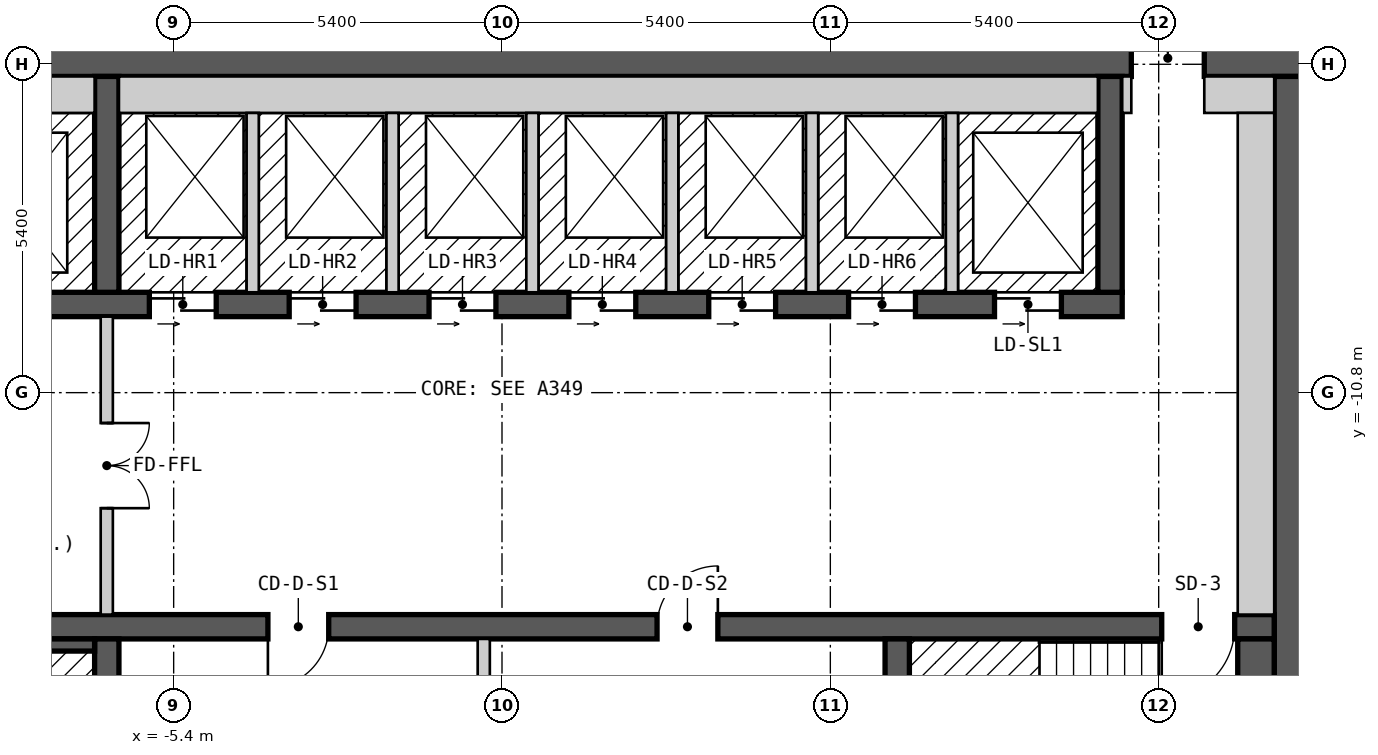
"""IFC4 building model, lengths in metres.
Left out: names, types, materials, properties, quantities, classifications, styles, units other than length and angle.
Written with IfcOpenShell. Run it as: python <this file> out.ifc"""

import sys

from ifc_helpers import new_model, si_unit, direction, frame, frame_2d, origin, place, context, subcontext, project, spatial, rectangle, extrude, element, fill, save


model = new_model("IFC4")
c1 = context("Model", 3, precision=1e-05, world=origin(), true_north=direction((0.0, 1.0)))
c2 = subcontext(c1, "Body", "Model", "MODEL_VIEW")
j1 = project(units=[si_unit("LENGTHUNIT", "METRE"), si_unit("PLANEANGLEUNIT", "RADIAN")], contexts=[c1])
p1 = place(None, origin())
s1 = spatial("IfcSite", under=j1, at=p1, CompositionType="ELEMENT")
p2 = place(p1, origin())
s2 = spatial("IfcBuilding", under=s1, at=p2, CompositionType="ELEMENT")
p3 = place(p2, frame((0.0, 0.0, 181.2)))
s3 = spatial("IfcBuildingStorey", under=s2, at=p3, CompositionType="ELEMENT", Elevation=181.2)
p4 = place(p3, frame((-13.3, -5.3, 0.0), z_axis=(0.0, 0.0, 1.0), x_axis=(1.0, 0.0, 0.0)))
e1 = element("IfcWall", 1, at=p4, inside=s3, PredefinedType="SHEAR", context=c2, shape_type="SweptSolid", body=[
    extrude(rectangle(XDim=26.6, YDim=0.6, at=frame_2d((13.3, 0.0))), origin(), (0.0, 0.0, 1.0), 2.7),
])
p5 = place(p4, frame((23.65, 0.0, 0.0)))
e2 = element("IfcOpeningElement", 2, at=p5, cuts=e1, PredefinedType="OPENING", context=c2, shape_type="SweptSolid", body=[
    extrude(rectangle(XDim=1.2, YDim=2.1, at=frame_2d((0.6, 1.05))), frame((0.0, 0.31, 0.0), z_axis=(0.0, -1.0, 0.0), x_axis=(1.0, 0.0, 0.0)), (0.0, 0.0, 1.0), 0.62),
])
p6 = place(p3, frame((13.0, -18.4, 0.0), z_axis=(0.0, 0.0, 1.0), x_axis=(0.0, 1.0, 0.0)))
e3 = element("IfcWall", 3, at=p6, inside=s3, PredefinedType="SHEAR", context=c2, shape_type="SweptSolid", body=[
    extrude(rectangle(XDim=12.8, YDim=0.6, at=frame_2d((6.4, 0.0))), origin(), (0.0, 0.0, 1.0), 2.7),
])
p7 = place(p3, frame((-12.7, -14.65, 0.0), z_axis=(0.0, 0.0, 1.0), x_axis=(1.0, 0.0, 0.0)))
e4 = element("IfcWall", 4, at=p7, inside=s3, PredefinedType="SHEAR", context=c2, shape_type="SweptSolid", body=[
    extrude(rectangle(XDim=25.4, YDim=0.4, at=frame_2d((12.7, 0.0))), origin(), (0.0, 0.0, 1.0), 2.7),
])
p8 = place(p7, frame((1.9, 0.0, 0.0), z_axis=(0.0, 0.0, 1.0), x_axis=(-1.0, 0.0, 0.0)))
e5 = element("IfcOpeningElement", 5, at=p8, cuts=e4, PredefinedType="OPENING", context=c2, shape_type="SweptSolid", body=[
    extrude(rectangle(XDim=1.2, YDim=2.1, at=frame_2d((0.6, 1.05))), frame((0.0, 0.21, 0.0), z_axis=(0.0, -1.0, 0.0), x_axis=(1.0, 0.0, 0.0)), (0.0, 0.0, 1.0), 0.42),
])
p9 = place(p7, frame((24.75, 0.0, 0.0), z_axis=(0.0, 0.0, 1.0), x_axis=(-1.0, 0.0, 0.0)))
e6 = element("IfcOpeningElement", 6, at=p9, cuts=e4, PredefinedType="OPENING", context=c2, shape_type="SweptSolid", body=[
    extrude(rectangle(XDim=1.2, YDim=2.1, at=frame_2d((0.6, 1.05))), frame((0.0, 0.21, 0.0), z_axis=(0.0, -1.0, 0.0), x_axis=(1.0, 0.0, 0.0)), (0.0, 0.0, 1.0), 0.42),
])
p10 = place(p7, frame((9.85, 0.0, 0.0), z_axis=(0.0, 0.0, 1.0), x_axis=(-1.0, 0.0, 0.0)))
e7 = element("IfcOpeningElement", 7, at=p10, cuts=e4, PredefinedType="OPENING", context=c2, shape_type="SweptSolid", body=[
    extrude(rectangle(XDim=1.0, YDim=2.1, at=frame_2d((0.5, 1.05))), frame((0.0, 0.21, 0.0), z_axis=(0.0, -1.0, 0.0), x_axis=(1.0, 0.0, 0.0)), (0.0, 0.0, 1.0), 0.42),
])
p11 = place(p7, frame((16.25, 0.0, 0.0), z_axis=(0.0, 0.0, 1.0), x_axis=(-1.0, 0.0, 0.0)))
e8 = element("IfcOpeningElement", 8, at=p11, cuts=e4, PredefinedType="OPENING", context=c2, shape_type="SweptSolid", body=[
    extrude(rectangle(XDim=1.0, YDim=2.1, at=frame_2d((0.5, 1.05))), frame((0.0, 0.21, 0.0), z_axis=(0.0, -1.0, 0.0), x_axis=(1.0, 0.0, 0.0)), (0.0, 0.0, 1.0), 0.42),
])
p12 = place(p3, frame((-12.7, -9.35, 0.0), z_axis=(0.0, 0.0, 1.0), x_axis=(1.0, 0.0, 0.0)))
e9 = element("IfcWall", 9, at=p12, inside=s3, PredefinedType="SHEAR", context=c2, shape_type="SweptSolid", body=[
    extrude(rectangle(XDim=22.9, YDim=0.4, at=frame_2d((11.45, 0.0))), origin(), (0.0, 0.0, 1.0), 2.7),
])
p13 = place(p12, frame((1.3, 0.0, 0.0)))
e10 = element("IfcOpeningElement", 10, at=p13, cuts=e9, PredefinedType="OPENING", context=c2, shape_type="SweptSolid", body=[
    extrude(rectangle(XDim=1.1, YDim=2.1, at=frame_2d((0.55, 1.05))), frame((0.0, 0.21, 0.0), z_axis=(0.0, -1.0, 0.0), x_axis=(1.0, 0.0, 0.0)), (0.0, 0.0, 1.0), 0.42),
])
p14 = place(p12, frame((4.1, 0.0, 0.0)))
e11 = element("IfcOpeningElement", 11, at=p14, cuts=e9, PredefinedType="OPENING", context=c2, shape_type="SweptSolid", body=[
    extrude(rectangle(XDim=1.1, YDim=2.1, at=frame_2d((0.55, 1.05))), frame((0.0, 0.21, 0.0), z_axis=(0.0, -1.0, 0.0), x_axis=(1.0, 0.0, 0.0)), (0.0, 0.0, 1.0), 0.42),
])
p15 = place(p12, frame((6.9, 0.0, 0.0)))
e12 = element("IfcOpeningElement", 12, at=p15, cuts=e9, PredefinedType="OPENING", context=c2, shape_type="SweptSolid", body=[
    extrude(rectangle(XDim=1.1, YDim=2.1, at=frame_2d((0.55, 1.05))), frame((0.0, 0.21, 0.0), z_axis=(0.0, -1.0, 0.0), x_axis=(1.0, 0.0, 0.0)), (0.0, 0.0, 1.0), 0.42),
])
p16 = place(p12, frame((9.2, 0.0, 0.0)))
e13 = element("IfcOpeningElement", 13, at=p16, cuts=e9, PredefinedType="OPENING", context=c2, shape_type="SweptSolid", body=[
    extrude(rectangle(XDim=1.1, YDim=2.1, at=frame_2d((0.55, 1.05))), frame((0.0, 0.21, 0.0), z_axis=(0.0, -1.0, 0.0), x_axis=(1.0, 0.0, 0.0)), (0.0, 0.0, 1.0), 0.42),
])
p17 = place(p12, frame((11.5, 0.0, 0.0)))
e14 = element("IfcOpeningElement", 14, at=p17, cuts=e9, PredefinedType="OPENING", context=c2, shape_type="SweptSolid", body=[
    extrude(rectangle(XDim=1.1, YDim=2.1, at=frame_2d((0.55, 1.05))), frame((0.0, 0.21, 0.0), z_axis=(0.0, -1.0, 0.0), x_axis=(1.0, 0.0, 0.0)), (0.0, 0.0, 1.0), 0.42),
])
p18 = place(p12, frame((13.8, 0.0, 0.0)))
e15 = element("IfcOpeningElement", 15, at=p18, cuts=e9, PredefinedType="OPENING", context=c2, shape_type="SweptSolid", body=[
    extrude(rectangle(XDim=1.1, YDim=2.1, at=frame_2d((0.55, 1.05))), frame((0.0, 0.21, 0.0), z_axis=(0.0, -1.0, 0.0), x_axis=(1.0, 0.0, 0.0)), (0.0, 0.0, 1.0), 0.42),
])
p19 = place(p12, frame((16.1, 0.0, 0.0)))
e16 = element("IfcOpeningElement", 16, at=p19, cuts=e9, PredefinedType="OPENING", context=c2, shape_type="SweptSolid", body=[
    extrude(rectangle(XDim=1.1, YDim=2.1, at=frame_2d((0.55, 1.05))), frame((0.0, 0.21, 0.0), z_axis=(0.0, -1.0, 0.0), x_axis=(1.0, 0.0, 0.0)), (0.0, 0.0, 1.0), 0.42),
])
p20 = place(p12, frame((18.4, 0.0, 0.0)))
e17 = element("IfcOpeningElement", 17, at=p20, cuts=e9, PredefinedType="OPENING", context=c2, shape_type="SweptSolid", body=[
    extrude(rectangle(XDim=1.1, YDim=2.1, at=frame_2d((0.55, 1.05))), frame((0.0, 0.21, 0.0), z_axis=(0.0, -1.0, 0.0), x_axis=(1.0, 0.0, 0.0)), (0.0, 0.0, 1.0), 0.42),
])
p21 = place(p12, frame((20.8, 0.0, 0.0)))
e18 = element("IfcOpeningElement", 18, at=p21, cuts=e9, PredefinedType="OPENING", context=c2, shape_type="SweptSolid", body=[
    extrude(rectangle(XDim=1.1, YDim=2.1, at=frame_2d((0.55, 1.05))), frame((0.0, 0.21, 0.0), z_axis=(0.0, -1.0, 0.0), x_axis=(1.0, 0.0, 0.0)), (0.0, 0.0, 1.0), 0.42),
])
for number, where, z_axis, x_axis in (
    (19, (-6.5, -18.4, 0.0), (0.0, 0.0, 1.0), (0.0, 1.0, 0.0)),
    (20, (6.5, -18.4, 0.0), (0.0, 0.0, 1.0), (0.0, 1.0, 0.0)),
    (21, (-6.5, -9.15, 0.0), (0.0, 0.0, 1.0), (0.0, 1.0, 0.0)),
    (22, (10.0, -9.15, 0.0), (0.0, 0.0, 1.0), (0.0, 1.0, 0.0)),
):
    element("IfcWall", number, at=place(p3, frame(where, z_axis=z_axis, x_axis=x_axis)), inside=s3, PredefinedType="SHEAR", context=c2, shape_type="SweptSolid", body=[
        extrude(rectangle(XDim=3.55, YDim=0.4, at=frame_2d((1.775, 0.0))), origin(), (0.0, 0.0, 1.0), 2.7),
    ])
p22 = place(p3, frame((-12.1, -5.9, 0.0), z_axis=(0.0, 0.0, 1.0), x_axis=(1.0, 0.0, 0.0)))
e23 = element("IfcWall", 23, at=p22, inside=s3, PredefinedType="SOLIDWALL", context=c2, shape_type="SweptSolid", body=[
    extrude(rectangle(XDim=5.4, YDim=0.6, at=frame_2d((2.7, 0.0))), origin(), (0.0, 0.0, 1.0), 2.7),
])
p23 = place(p3, frame((-10.8, -14.95, 0.0), z_axis=(0.0, 0.0, 1.0), x_axis=(1.0, 0.0, 0.0)))
e24 = element("IfcWall", 24, at=p23, inside=s3, PredefinedType="SOLIDWALL", context=c2, shape_type="SweptSolid", body=[
    extrude(rectangle(XDim=4.1, YDim=0.2, at=frame_2d((2.05, 0.0))), origin(), (0.0, 0.0, 1.0), 2.7),
])
p24 = place(p3, frame((-6.5, -14.45, 0.0), z_axis=(0.0, 0.0, 1.0), x_axis=(0.0, 1.0, 0.0)))
e25 = element("IfcWall", 25, at=p24, inside=s3, PredefinedType="PARTITIONING", context=c2, shape_type="SweptSolid", body=[
    extrude(rectangle(XDim=4.9, YDim=0.2, at=frame_2d((2.45, 0.0))), origin(), (0.0, 0.0, 1.0), 2.7),
])
p25 = place(p24, frame((3.15, 0.0, 0.0), z_axis=(0.0, 0.0, 1.0), x_axis=(-1.0, 0.0, 0.0)))
e26 = element("IfcOpeningElement", 26, at=p25, cuts=e25, PredefinedType="OPENING", context=c2, shape_type="SweptSolid", body=[
    extrude(rectangle(XDim=1.4, YDim=2.1, at=frame_2d((0.7, 1.05))), frame((0.0, 0.11, 0.0), z_axis=(0.0, -1.0, 0.0), x_axis=(1.0, 0.0, 0.0)), (0.0, 0.0, 1.0), 0.22),
])
p26 = place(p3, frame((-6.3, -5.9, 0.0), z_axis=(0.0, 0.0, 1.0), x_axis=(1.0, 0.0, 0.0)))
e27 = element("IfcWall", 27, at=p26, inside=s3, PredefinedType="SOLIDWALL", context=c2, shape_type="SweptSolid", body=[
    extrude(rectangle(XDim=16.1, YDim=0.6, at=frame_2d((8.05, 0.0))), origin(), (0.0, 0.0, 1.0), 2.7),
])
for number, where, z_axis, x_axis in (
    (28, (-4.1, -9.15, 0.0), (0.0, 0.0, 1.0), (0.0, 1.0, 0.0)),
    (29, (-1.8, -9.15, 0.0), (0.0, 0.0, 1.0), (0.0, 1.0, 0.0)),
):
    element("IfcWall", number, at=place(p3, frame(where, z_axis=z_axis, x_axis=x_axis)), inside=s3, PredefinedType="SOLIDWALL", context=c2, shape_type="SweptSolid", body=[
        extrude(rectangle(XDim=2.95, YDim=0.2, at=frame_2d((1.475, 0.0))), origin(), (0.0, 0.0, 1.0), 2.7),
    ])
p27 = place(p3, frame((-0.3, -17.8, 0.0), z_axis=(0.0, 0.0, 1.0), x_axis=(0.0, 1.0, 0.0)))
e30 = element("IfcWall", 30, at=p27, inside=s3, PredefinedType="PARTITIONING", context=c2, shape_type="SweptSolid", body=[
    extrude(rectangle(XDim=2.95, YDim=0.2, at=frame_2d((1.475, 0.0))), origin(), (0.0, 0.0, 1.0), 2.7),
])
for number, where, z_axis, x_axis in (
    (31, (0.5, -9.15, 0.0), (0.0, 0.0, 1.0), (0.0, 1.0, 0.0)),
    (32, (2.8, -9.15, 0.0), (0.0, 0.0, 1.0), (0.0, 1.0, 0.0)),
    (33, (5.1, -9.15, 0.0), (0.0, 0.0, 1.0), (0.0, 1.0, 0.0)),
    (34, (7.4, -9.15, 0.0), (0.0, 0.0, 1.0), (0.0, 1.0, 0.0)),
):
    element("IfcWall", number, at=place(p3, frame(where, z_axis=z_axis, x_axis=x_axis)), inside=s3, PredefinedType="SOLIDWALL", context=c2, shape_type="SweptSolid", body=[
        extrude(rectangle(XDim=2.95, YDim=0.2, at=frame_2d((1.475, 0.0))), origin(), (0.0, 0.0, 1.0), 2.7),
    ])
p28 = place(p3, frame((10.275, -6.2, 0.0), z_axis=(0.0, 0.0, 1.0), x_axis=(0.0, 1.0, 0.0)))
e35 = element("IfcWall", 35, at=p28, inside=s3, PredefinedType="PARTITIONING", context=c2, shape_type="SweptSolid", body=[
    extrude(rectangle(XDim=0.6, YDim=0.15, at=frame_2d((0.3, 0.0))), origin(), (0.0, 0.0, 1.0), 2.7),
])
p29 = place(p3, frame((11.55, -5.9, 0.0), z_axis=(0.0, 0.0, 1.0), x_axis=(1.0, 0.0, 0.0)))
e36 = element("IfcWall", 36, at=p29, inside=s3, PredefinedType="PARTITIONING", context=c2, shape_type="SweptSolid", body=[
    extrude(rectangle(XDim=1.15, YDim=0.6, at=frame_2d((0.575, 0.0))), origin(), (0.0, 0.0, 1.0), 2.7),
])
p30 = place(p3, frame((12.4, -17.6, 0.0), z_axis=(0.0, 0.0, 1.0), x_axis=(0.0, 1.0, 0.0)))
e37 = element("IfcWall", 37, at=p30, inside=s3, PredefinedType="SOLIDWALL", context=c2, shape_type="SweptSolid", body=[
    extrude(rectangle(XDim=2.75, YDim=0.6, at=frame_2d((1.375, 0.0))), origin(), (0.0, 0.0, 1.0), 2.7),
])
p31 = place(p3, frame((12.4, -14.45, 0.0), z_axis=(0.0, 0.0, 1.0), x_axis=(0.0, 1.0, 0.0)))
e38 = element("IfcWall", 38, at=p31, inside=s3, PredefinedType="PARTITIONING", context=c2, shape_type="SweptSolid", body=[
    extrude(rectangle(XDim=8.25, YDim=0.6, at=frame_2d((4.125, 0.0))), origin(), (0.0, 0.0, 1.0), 2.7),
])
p32 = place(p15, origin())
e39 = element("IfcDoor", 39, at=p32, inside=s3, OperationType="DOUBLE_DOOR_SLIDING", PredefinedType="DOOR", context=c2, shape_type="SweptSolid", body=[
    extrude(rectangle(XDim=1.1, YDim=2.1, at=frame_2d((0.55, 1.05))), frame((0.0, 0.025, 0.0), z_axis=(0.0, -1.0, 0.0), x_axis=(1.0, 0.0, 0.0)), (0.0, 0.0, 1.0), 0.05),
])
fill(e12, e39)
p33 = place(p16, origin())
e40 = element("IfcDoor", 40, at=p33, inside=s3, OperationType="DOUBLE_DOOR_SLIDING", PredefinedType="DOOR", context=c2, shape_type="SweptSolid", body=[
    extrude(rectangle(XDim=1.1, YDim=2.1, at=frame_2d((0.55, 1.05))), frame((0.0, 0.025, 0.0), z_axis=(0.0, -1.0, 0.0), x_axis=(1.0, 0.0, 0.0)), (0.0, 0.0, 1.0), 0.05),
])
fill(e13, e40)
p34 = place(p17, origin())
e41 = element("IfcDoor", 41, at=p34, inside=s3, OperationType="DOUBLE_DOOR_SLIDING", PredefinedType="DOOR", context=c2, shape_type="SweptSolid", body=[
    extrude(rectangle(XDim=1.1, YDim=2.1, at=frame_2d((0.55, 1.05))), frame((0.0, 0.025, 0.0), z_axis=(0.0, -1.0, 0.0), x_axis=(1.0, 0.0, 0.0)), (0.0, 0.0, 1.0), 0.05),
])
fill(e14, e41)
p35 = place(p18, origin())
e42 = element("IfcDoor", 42, at=p35, inside=s3, OperationType="DOUBLE_DOOR_SLIDING", PredefinedType="DOOR", context=c2, shape_type="SweptSolid", body=[
    extrude(rectangle(XDim=1.1, YDim=2.1, at=frame_2d((0.55, 1.05))), frame((0.0, 0.025, 0.0), z_axis=(0.0, -1.0, 0.0), x_axis=(1.0, 0.0, 0.0)), (0.0, 0.0, 1.0), 0.05),
])
fill(e15, e42)
p36 = place(p19, origin())
e43 = element("IfcDoor", 43, at=p36, inside=s3, OperationType="DOUBLE_DOOR_SLIDING", PredefinedType="DOOR", context=c2, shape_type="SweptSolid", body=[
    extrude(rectangle(XDim=1.1, YDim=2.1, at=frame_2d((0.55, 1.05))), frame((0.0, 0.025, 0.0), z_axis=(0.0, -1.0, 0.0), x_axis=(1.0, 0.0, 0.0)), (0.0, 0.0, 1.0), 0.05),
])
fill(e16, e43)
p37 = place(p20, origin())
e44 = element("IfcDoor", 44, at=p37, inside=s3, OperationType="DOUBLE_DOOR_SLIDING", PredefinedType="DOOR", context=c2, shape_type="SweptSolid", body=[
    extrude(rectangle(XDim=1.1, YDim=2.1, at=frame_2d((0.55, 1.05))), frame((0.0, 0.025, 0.0), z_axis=(0.0, -1.0, 0.0), x_axis=(1.0, 0.0, 0.0)), (0.0, 0.0, 1.0), 0.05),
])
fill(e17, e44)
p38 = place(p21, origin())
e45 = element("IfcDoor", 45, at=p38, inside=s3, OperationType="DOUBLE_DOOR_SLIDING", PredefinedType="DOOR", context=c2, shape_type="SweptSolid", body=[
    extrude(rectangle(XDim=1.1, YDim=2.1, at=frame_2d((0.55, 1.05))), frame((0.0, 0.025, 0.0), z_axis=(0.0, -1.0, 0.0), x_axis=(1.0, 0.0, 0.0)), (0.0, 0.0, 1.0), 0.05),
])
fill(e18, e45)
p39 = place(p9, origin())
e46 = element("IfcDoor", 46, at=p39, inside=s3, OperationType="SINGLE_SWING_RIGHT", PredefinedType="DOOR", context=c2, shape_type="SweptSolid", body=[
    extrude(rectangle(XDim=1.2, YDim=2.1, at=frame_2d((0.6, 1.05))), frame((0.0, 0.025, 0.0), z_axis=(0.0, -1.0, 0.0), x_axis=(1.0, 0.0, 0.0)), (0.0, 0.0, 1.0), 0.05),
])
fill(e6, e46)
p40 = place(p25, origin())
e47 = element("IfcDoor", 47, at=p40, inside=s3, OperationType="DOUBLE_DOOR_SINGLE_SWING", PredefinedType="DOOR", context=c2, shape_type="SweptSolid", body=[
    extrude(rectangle(XDim=1.4, YDim=2.1, at=frame_2d((0.7, 1.05))), frame((0.0, 0.025, 0.0), z_axis=(0.0, -1.0, 0.0), x_axis=(1.0, 0.0, 0.0)), (0.0, 0.0, 1.0), 0.05),
])
fill(e26, e47)
p41 = place(p5, origin())
e48 = element("IfcDoor", 48, at=p41, inside=s3, OperationType="DOUBLE_DOOR_SINGLE_SWING", PredefinedType="DOOR", context=c2, shape_type="SweptSolid", body=[
    extrude(rectangle(XDim=1.2, YDim=2.1, at=frame_2d((0.6, 1.05))), frame((0.0, 0.025, 0.0), z_axis=(0.0, -1.0, 0.0), x_axis=(1.0, 0.0, 0.0)), (0.0, 0.0, 1.0), 0.05),
])
fill(e2, e48)
p42 = place(p10, origin())
e49 = element("IfcDoor", 49, at=p42, inside=s3, OperationType="SINGLE_SWING_RIGHT", PredefinedType="DOOR", context=c2, shape_type="SweptSolid", body=[
    extrude(rectangle(XDim=1.0, YDim=2.1, at=frame_2d((0.5, 1.05))), frame((0.0, 0.025, 0.0), z_axis=(0.0, -1.0, 0.0), x_axis=(1.0, 0.0, 0.0)), (0.0, 0.0, 1.0), 0.05),
])
fill(e7, e49)
p43 = place(p11, origin())
e50 = element("IfcDoor", 50, at=p43, inside=s3, OperationType="SINGLE_SWING_LEFT", PredefinedType="DOOR", context=c2, shape_type="SweptSolid", body=[
    extrude(rectangle(XDim=1.0, YDim=2.1, at=frame_2d((0.5, 1.05))), frame((0.0, 0.025, 0.0), z_axis=(0.0, -1.0, 0.0), x_axis=(1.0, 0.0, 0.0)), (0.0, 0.0, 1.0), 0.05),
])
fill(e8, e50)
save(model, sys.argv[1])
